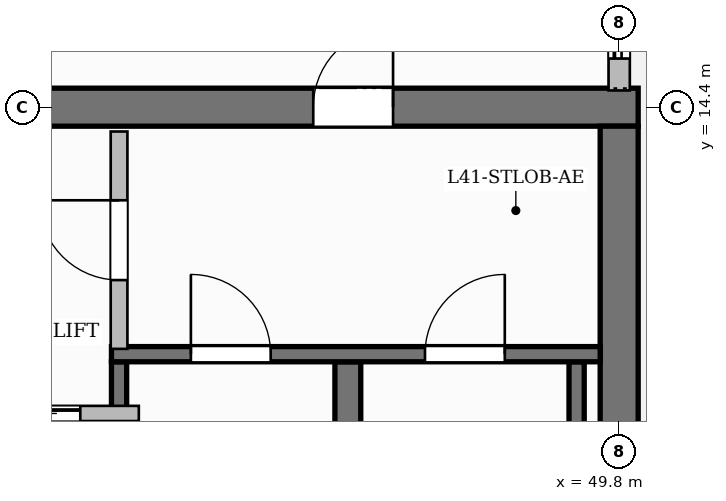
"""IFC4 building model, lengths in metres.
Left out: names, types, materials, properties, quantities, classifications, styles, units other than length and angle.
Written with IfcOpenShell. Run it as: python <this file> out.ifc"""

import sys

from ifc_helpers import new_model, si_unit, direction, frame, frame_2d, origin, place, context, subcontext, project, spatial, rectangle, extrude, source, transform, mapped, element, fill, save


model = new_model("IFC4")
c1 = context("Model", 3, precision=1e-05, world=origin(), true_north=direction((0.0, 1.0)))
c2 = subcontext(c1, "Body", "Model", "MODEL_VIEW")
j1 = project(units=[si_unit("LENGTHUNIT", "METRE"), si_unit("PLANEANGLEUNIT", "RADIAN")], contexts=[c1])
p1 = place(None, origin())
s1 = spatial("IfcSite", under=j1, at=p1, CompositionType="ELEMENT")
p2 = place(p1, origin())
s2 = spatial("IfcBuilding", under=s1, at=p2, CompositionType="ELEMENT")
p3 = place(p2, frame((0.0, 0.0, 165.7)))
s3 = spatial("IfcBuildingStorey", under=s2, at=p3, CompositionType="ELEMENT", Elevation=165.7)
p4 = place(p3, frame((34.55, 14.4, 0.0), z_axis=(0.0, 0.0, 1.0), x_axis=(1.0, 0.0, 0.0)))
e1 = element("IfcWall", 1, at=p4, inside=s3, PredefinedType="SHEAR", context=c2, shape_type="SweptSolid", body=[
    extrude(rectangle(XDim=15.5, YDim=0.5, at=frame_2d((7.75, 0.0))), origin(), (0.0, 0.0, 1.0), 3.85),
])
p5 = place(p4, frame((5.38, 0.0, 0.0)))
e2 = element("IfcOpeningElement", 2, at=p5, cuts=e1, PredefinedType="OPENING", context=c2, shape_type="SweptSolid", body=[
    extrude(rectangle(XDim=1.5, YDim=2.2, at=frame_2d((0.75, 1.1))), frame((0.0, 0.26, 0.0), z_axis=(0.0, -1.0, 0.0), x_axis=(1.0, 0.0, 0.0)), (0.0, 0.0, 1.0), 0.52),
])
p6 = place(p4, frame((1.595, 0.0, 0.0)))
e3 = element("IfcOpeningElement", 3, at=p6, cuts=e1, PredefinedType="OPENING", context=c2, shape_type="SweptSolid", body=[
    extrude(rectangle(XDim=1.05, YDim=2.15, at=frame_2d((0.525, 1.075))), frame((0.0, 0.26, 0.0), z_axis=(0.0, -1.0, 0.0), x_axis=(1.0, 0.0, 0.0)), (0.0, 0.0, 1.0), 0.52),
])
p7 = place(p4, frame((11.225, 0.0, 0.0)))
e4 = element("IfcOpeningElement", 4, at=p7, cuts=e1, PredefinedType="OPENING", context=c2, shape_type="SweptSolid", body=[
    extrude(rectangle(XDim=1.05, YDim=2.15, at=frame_2d((0.525, 1.075))), frame((0.0, 0.26, 0.0), z_axis=(0.0, -1.0, 0.0), x_axis=(1.0, 0.0, 0.0)), (0.0, 0.0, 1.0), 0.52),
])
p8 = place(p3, frame((49.8, 3.85, 0.0), z_axis=(0.0, 0.0, 1.0), x_axis=(0.0, 1.0, 0.0)))
e5 = element("IfcWall", 5, at=p8, inside=s3, PredefinedType="SHEAR", context=c2, shape_type="SweptSolid", body=[
    extrude(rectangle(XDim=10.3, YDim=0.5, at=frame_2d((5.15, 0.0))), origin(), (0.0, 0.0, 1.0), 3.85),
])
p9 = place(p3, frame((43.22, 4.1, 0.0), z_axis=(0.0, 0.0, 1.0), x_axis=(0.0, 1.0, 0.0)))
e6 = element("IfcWall", 6, at=p9, inside=s3, PredefinedType="SHEAR", context=c2, shape_type="SweptSolid", body=[
    extrude(rectangle(XDim=6.95, YDim=0.2, at=frame_2d((3.475, 0.0))), origin(), (0.0, 0.0, 1.0), 3.85),
])
p10 = place(p3, frame((46.23, 4.1, 0.0), z_axis=(0.0, 0.0, 1.0), x_axis=(0.0, 1.0, 0.0)))
e7 = element("IfcWall", 7, at=p10, inside=s3, PredefinedType="SHEAR", context=c2, shape_type="SweptSolid", body=[
    extrude(rectangle(XDim=6.95, YDim=0.34, at=frame_2d((3.475, 0.0))), origin(), (0.0, 0.0, 1.0), 3.85),
])
p11 = place(p3, frame((49.24, 4.1, 0.0), z_axis=(0.0, 0.0, 1.0), x_axis=(0.0, 1.0, 0.0)))
e8 = element("IfcWall", 8, at=p11, inside=s3, PredefinedType="SHEAR", context=c2, shape_type="SweptSolid", body=[
    extrude(rectangle(XDim=6.95, YDim=0.2, at=frame_2d((3.475, 0.0))), origin(), (0.0, 0.0, 1.0), 3.85),
])
p12 = place(p3, frame((43.12, 11.15, 0.0), z_axis=(0.0, 0.0, 1.0), x_axis=(1.0, 0.0, 0.0)))
e9 = element("IfcWall", 9, at=p12, inside=s3, PredefinedType="SHEAR", context=c2, shape_type="SweptSolid", body=[
    extrude(rectangle(XDim=6.43, YDim=0.2, at=frame_2d((3.215, 0.0))), origin(), (0.0, 0.0, 1.0), 3.85),
])
p13 = place(p12, frame((1.045, 0.0, 0.0)))
e10 = element("IfcOpeningElement", 10, at=p13, cuts=e9, PredefinedType="OPENING", context=c2, shape_type="SweptSolid", body=[
    extrude(rectangle(XDim=1.05, YDim=2.2, at=frame_2d((0.525, 1.1))), frame((0.0, 0.11, 0.0), z_axis=(0.0, -1.0, 0.0), x_axis=(1.0, 0.0, 0.0)), (0.0, 0.0, 1.0), 0.22),
])
p14 = place(p12, frame((4.125, 0.0, 0.0)))
e11 = element("IfcOpeningElement", 11, at=p14, cuts=e9, PredefinedType="OPENING", context=c2, shape_type="SweptSolid", body=[
    extrude(rectangle(XDim=1.05, YDim=2.2, at=frame_2d((0.525, 1.1))), frame((0.0, 0.11, 0.0), z_axis=(0.0, -1.0, 0.0), x_axis=(1.0, 0.0, 0.0)), (0.0, 0.0, 1.0), 0.22),
])
p15 = place(p3, frame((43.22, 11.22, 0.0), z_axis=(0.0, 0.0, 1.0), x_axis=(0.0, 1.0, 0.0)))
e12 = element("IfcWall", 12, at=p15, inside=s3, PredefinedType="PARTITIONING", context=c2, shape_type="SweptSolid", body=[
    extrude(rectangle(XDim=2.86, YDim=0.22, at=frame_2d((1.43, 0.0))), origin(), (0.0, 0.0, 1.0), 3.6),
])
p16 = place(p15, frame((0.905, 0.0, 0.0)))
e13 = element("IfcOpeningElement", 13, at=p16, cuts=e12, PredefinedType="OPENING", context=c2, shape_type="SweptSolid", body=[
    extrude(rectangle(XDim=1.05, YDim=2.15, at=frame_2d((0.525, 1.075))), frame((0.0, 0.12, 0.0), z_axis=(0.0, -1.0, 0.0), x_axis=(1.0, 0.0, 0.0)), (0.0, 0.0, 1.0), 0.24),
])
p17 = place(p3, frame((40.84, 10.37, 0.0), z_axis=(0.0, 0.0, 1.0), x_axis=(1.0, 0.0, 0.0)))
e14 = element("IfcWall", 14, at=p17, inside=s3, PredefinedType="PARTITIONING", context=c2, shape_type="SweptSolid", body=[
    extrude(rectangle(XDim=2.64, YDim=0.2, at=frame_2d((1.32, 0.0))), origin(), (0.0, 0.0, 1.0), 3.6),
])
p18 = place(p17, frame((0.77, 0.0, 0.0)))
e15 = element("IfcOpeningElement", 15, at=p18, cuts=e14, PredefinedType="OPENING", context=c2, shape_type="SweptSolid", body=[
    extrude(rectangle(XDim=1.1, YDim=2.2, at=frame_2d((0.55, 1.1))), frame((0.0, 0.11, 0.0), z_axis=(0.0, -1.0, 0.0), x_axis=(1.0, 0.0, 0.0)), (0.0, 0.0, 1.0), 0.22),
])
p19 = place(p3, frame((49.8, 14.62, 0.0), z_axis=(0.0, 0.0, 1.0), x_axis=(0.0, 1.0, 0.0)))
e16 = element("IfcWall", 16, at=p19, inside=s3, PredefinedType="SOLIDWALL", context=c2, shape_type="SweptSolid", body=[
    extrude(rectangle(XDim=6.93, YDim=0.28, at=frame_2d((3.465, 0.0))), origin(), (0.0, 0.0, 1.0), 3.085),
])
p20 = place(p19, frame((0.42, 0.0, 0.0)))
e17 = element("IfcOpeningElement", 17, at=p20, cuts=e16, PredefinedType="OPENING", context=c2, shape_type="SweptSolid", body=[
    extrude(rectangle(XDim=1.2, YDim=2.2, at=frame_2d((0.6, 1.1))), frame((0.0, 0.15, 0.0), z_axis=(0.0, -1.0, 0.0), x_axis=(1.0, 0.0, 0.0)), (0.0, 0.0, 1.0), 0.3),
])
p21 = place(p19, frame((3.659, 0.0, 0.8)))
e18 = element("IfcOpeningElement", 18, at=p21, cuts=e16, PredefinedType="OPENING", context=c2, shape_type="SweptSolid", body=[
    extrude(rectangle(XDim=1.8, YDim=1.85, at=frame_2d((0.9, 0.925))), frame((0.0, 0.15, 0.0), z_axis=(0.0, -1.0, 0.0), x_axis=(1.0, 0.0, 0.0)), (0.0, 0.0, 1.0), 0.3),
])
m1 = source(origin(), c2, "Body", "SweptSolid", [
    extrude(rectangle(XDim=1.05, YDim=2.2, at=frame_2d((0.525, 1.1))), frame((0.0, 0.025, 0.0), z_axis=(0.0, -1.0, 0.0), x_axis=(1.0, 0.0, 0.0)), (0.0, 0.0, 1.0), 0.05),
])
p22 = place(p13, origin())
e19 = element("IfcDoor", 19, at=p22, inside=s3, OperationType="SINGLE_SWING_LEFT", PredefinedType="DOOR", context=c2, shape_type="MappedRepresentation", body=[
    mapped(m1, transform((0.0, 0.0, 0.0), scale=1.0)),
])
fill(e10, e19)
p23 = place(p14, origin())
e20 = element("IfcDoor", 20, at=p23, inside=s3, OperationType="SINGLE_SWING_RIGHT", PredefinedType="DOOR", context=c2, shape_type="MappedRepresentation", body=[
    mapped(m1, transform((0.0, 0.0, 0.0), scale=1.0)),
])
fill(e11, e20)
m2 = source(origin(), c2, "Body", "SweptSolid", [
    extrude(rectangle(XDim=1.05, YDim=2.15, at=frame_2d((0.525, 1.075))), frame((0.0, 0.025, 0.0), z_axis=(0.0, -1.0, 0.0), x_axis=(1.0, 0.0, 0.0)), (0.0, 0.0, 1.0), 0.05),
])
p24 = place(p16, origin())
e21 = element("IfcDoor", 21, at=p24, inside=s3, OperationType="SINGLE_SWING_RIGHT", PredefinedType="DOOR", context=c2, shape_type="MappedRepresentation", body=[
    mapped(m2, transform((0.0, 0.0, 0.0), scale=1.0)),
])
fill(e13, e21)
p25 = place(p7, origin())
e22 = element("IfcDoor", 22, at=p25, inside=s3, OperationType="SINGLE_SWING_RIGHT", PredefinedType="DOOR", context=c2, shape_type="MappedRepresentation", body=[
    mapped(m2, transform((0.0, 0.0, 0.0), scale=1.0)),
])
fill(e4, e22)
m3 = source(origin(), c2, "Body", "SweptSolid", [
    extrude(rectangle(XDim=1.1, YDim=2.2, at=frame_2d((0.55, 1.1))), frame((0.0, 0.025, 0.0), z_axis=(0.0, -1.0, 0.0), x_axis=(1.0, 0.0, 0.0)), (0.0, 0.0, 1.0), 0.05),
])
p26 = place(p18, origin())
e23 = element("IfcDoor", 23, at=p26, inside=s3, OperationType="SLIDING_TO_LEFT", PredefinedType="DOOR", context=c2, shape_type="MappedRepresentation", body=[
    mapped(m3, transform((0.0, 0.0, 0.0), scale=1.0)),
])
fill(e15, e23)
m4 = source(origin(), c2, "Body", "SweptSolid", [
    extrude(rectangle(XDim=1.2, YDim=2.2, at=frame_2d((0.6, 1.1))), frame((0.0, 0.025, 0.0), z_axis=(0.0, -1.0, 0.0), x_axis=(1.0, 0.0, 0.0)), (0.0, 0.0, 1.0), 0.05),
])
p27 = place(p20, origin())
e24 = element("IfcDoor", 24, at=p27, inside=s3, OperationType="SLIDING_TO_LEFT", PredefinedType="DOOR", context=c2, shape_type="MappedRepresentation", body=[
    mapped(m4, transform((0.0, 0.0, 0.0), scale=1.0)),
])
fill(e17, e24)
save(model, sys.argv[1])
